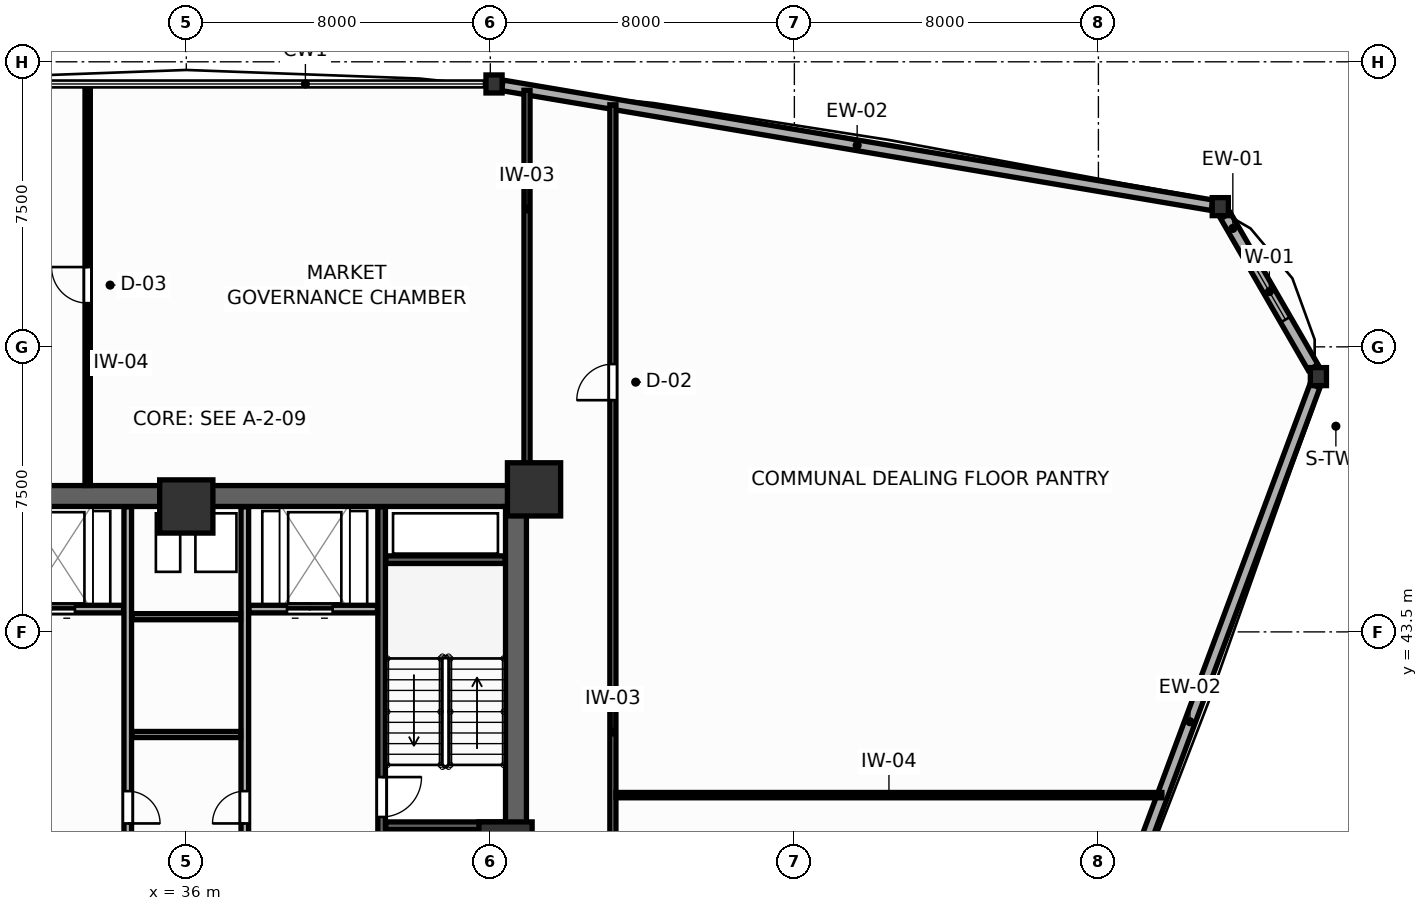
"""IFC4 building model, lengths in metres.
Left out: names, types, materials, properties, quantities, classifications, styles, units other than length and angle.
Written with IfcOpenShell. Run it as: python <this file> out.ifc"""

import sys

from ifc_helpers import new_model, si_unit, direction, frame, frame_2d, origin, origin_2d, place, context, subcontext, project, spatial, rectangle, i_section, extrude, source, transform, mapped, element, fill, save


model = new_model("IFC4")
c1 = context("Model", 3, precision=1e-05, world=origin(), true_north=direction((0.0, 1.0)))
c2 = subcontext(c1, "Body", "Model", "MODEL_VIEW")
j1 = project(units=[si_unit("LENGTHUNIT", "METRE"), si_unit("PLANEANGLEUNIT", "RADIAN")], contexts=[c1])
p1 = place(None, origin())
s1 = spatial("IfcSite", under=j1, at=p1, CompositionType="ELEMENT")
p2 = place(p1, origin())
s2 = spatial("IfcBuilding", under=s1, at=p2, CompositionType="ELEMENT")
p3 = place(p2, frame((0.0, 0.0, 27.9)))
s3 = spatial("IfcBuildingStorey", under=s2, at=p3, CompositionType="ELEMENT", Elevation=27.9)
p4 = place(p3, frame((27.05, 47.075, 0.0), z_axis=(0.0, 0.0, 1.0), x_axis=(1.0, 0.0, 0.0)))
e1 = element("IfcWall", 1, at=p4, inside=s3, PredefinedType="SHEAR", context=c2, shape_type="SweptSolid", body=[
    extrude(rectangle(XDim=17.9, YDim=0.55, at=frame_2d((8.95, 0.0))), origin(), (0.0, 0.0, 1.0), 3.9),
])
p5 = place(p3, frame((44.675, 37.8, 0.0), z_axis=(0.0, 0.0, 1.0), x_axis=(0.0, 1.0, 0.0)))
e2 = element("IfcWall", 2, at=p5, inside=s3, PredefinedType="SHEAR", context=c2, shape_type="SweptSolid", body=[
    extrude(rectangle(XDim=9.0, YDim=0.55, at=frame_2d((4.5, 0.0))), origin(), (0.0, 0.0, 1.0), 3.9),
])
m1 = source(origin(), c2, "Body", "SweptSolid", [
    extrude(rectangle(XDim=1.4, YDim=1.4, at=origin_2d()), origin(), (0.0, 0.0, 1.0), 3.9),
])
for number, where, z_axis, x_axis in (
    (3, (45.15, 47.25, 0.0), (0.0, 0.0, 1.0), (1.0, 0.0, 0.0)),
    (4, (44.4, 37.8, 0.0), (0.0, 0.0, 1.0), (1.0, 0.0, 0.0)),
    (5, (36.0, 46.8, 0.0), (0.0, 0.0, 1.0), (1.0, 0.0, 0.0)),
):
    element("IfcColumn", number, at=place(p3, frame(where, z_axis=z_axis, x_axis=x_axis)), inside=s3, PredefinedType="COLUMN", context=c2, shape_type="MappedRepresentation", body=[
        mapped(m1, transform((0.0, 0.0, 0.0), scale=1.0)),
    ])
m2 = source(origin(), c2, "Body", "SweptSolid", [
    extrude(i_section(OverallWidth=0.424, OverallDepth=0.474, WebThickness=0.045, FlangeThickness=0.072, FilletRadius=0.015, at=origin_2d()), origin(), (0.0, 0.0, 1.0), 3.9),
])
for number, where, z_axis, x_axis in (
    (6, (65.789, 50.217, 0.0), (0.0, 0.0, 1.0), (1.0, 0.0, 0.0)),
    (7, (63.207, 54.689, 0.0), (0.0, 0.0, 1.0), (1.0, 0.0, 0.0)),
    (8, (44.097, 57.917, 0.0), (0.0, 0.0, 1.0), (1.0, 0.0, 0.0)),
):
    element("IfcColumn", number, at=place(p3, frame(where, z_axis=z_axis, x_axis=x_axis)), inside=s3, PredefinedType="COLUMN", context=c2, shape_type="MappedRepresentation", body=[
        mapped(m2, transform((0.0, 0.0, 0.0), scale=1.0)),
    ])
p6 = place(p3, frame((65.649, 50.459, 0.0), z_axis=(0.0, 0.0, 1.0), x_axis=(-0.500022295776, 0.86601253093, 0.0)))
e9 = element("IfcWall", 9, at=p6, inside=s3, PredefinedType="SOLIDWALL", context=c2, shape_type="SweptSolid", body=[
    extrude(rectangle(XDim=4.605, YDim=0.3, at=frame_2d((2.302, 0.0))), origin(), (0.0, 0.0, 1.0), 3.23),
])
p7 = place(p6, frame((1.452, 0.0, 0.75)))
e10 = element("IfcOpeningElement", 10, at=p7, cuts=e9, PredefinedType="OPENING", context=c2, shape_type="SweptSolid", body=[
    extrude(rectangle(XDim=1.7, YDim=1.75, at=frame_2d((0.85, 0.875))), frame((0.0, 0.16, 0.0), z_axis=(0.0, -1.0, 0.0), x_axis=(1.0, 0.0, 0.0)), (0.0, 0.0, 1.0), 0.32),
])
p8 = place(p3, frame((62.99, 54.726, 0.0), z_axis=(0.0, 0.0, 1.0), x_axis=(-0.98603202958, 0.166555806393, 0.0)))
e11 = element("IfcWall", 11, at=p8, inside=s3, PredefinedType="SOLIDWALL", context=c2, shape_type="SweptSolid", body=[
    extrude(rectangle(XDim=18.94, YDim=0.28, at=frame_2d((9.47, 0.0))), origin(), (0.0, 0.0, 1.0), 3.23),
])
p9 = place(p3, frame((59.12, 32.296, 0.0), z_axis=(0.0, 0.0, 1.0), x_axis=(0.348763587367, 0.937210734108, 0.0)))
e12 = element("IfcWall", 12, at=p9, inside=s3, PredefinedType="SOLIDWALL", context=c2, shape_type="SweptSolid", body=[
    extrude(rectangle(XDim=18.863, YDim=0.28, at=frame_2d((9.432, 0.0))), origin(), (0.0, 0.0, 1.0), 3.23),
])
p10 = place(p3, frame((41.14, 37.81, 0.0), z_axis=(0.0, 0.0, 1.0), x_axis=(0.0, 1.0, 0.0)))
e13 = element("IfcWall", 13, at=p10, inside=s3, PredefinedType="SHEAR", context=c2, shape_type="SweptSolid", body=[
    extrude(rectangle(XDim=8.98, YDim=0.2, at=frame_2d((4.49, 0.0))), origin(), (0.0, 0.0, 1.0), 3.9),
])
p11 = place(p10, frame((0.82, 0.0, 0.0)))
e14 = element("IfcOpeningElement", 14, at=p11, cuts=e13, PredefinedType="OPENING", context=c2, shape_type="SweptSolid", body=[
    extrude(rectangle(XDim=1.05, YDim=2.1, at=frame_2d((0.525, 1.05))), frame((0.0, 0.11, 0.0), z_axis=(0.0, -1.0, 0.0), x_axis=(1.0, 0.0, 0.0)), (0.0, 0.0, 1.0), 0.22),
])
for number, where, z_axis, x_axis in (
    (15, (41.25, 45.4, 0.0), (0.0, 0.0, 1.0), (1.0, 0.0, 0.0)),
    (16, (41.25, 38.4, 0.0), (0.0, 0.0, 1.0), (1.0, 0.0, 0.0)),
):
    element("IfcWall", number, at=place(p3, frame(where, z_axis=z_axis, x_axis=x_axis)), inside=s3, PredefinedType="SHEAR", context=c2, shape_type="SweptSolid", body=[
        extrude(rectangle(XDim=3.14, YDim=0.2, at=frame_2d((1.57, 0.0))), origin(), (0.0, 0.0, 1.0), 3.9),
    ])
p12 = place(p3, frame((30.97, 44.1, 0.0), z_axis=(0.0, 0.0, 1.0), x_axis=(1.0, 0.0, 0.0)))
e17 = element("IfcWall", 17, at=p12, inside=s3, PredefinedType="PARTITIONING", context=c2, shape_type="SweptSolid", body=[
    extrude(rectangle(XDim=3.38, YDim=0.2, at=frame_2d((1.69, 0.0))), origin(), (0.0, 0.0, 1.0), 3.68),
])
p13 = place(p12, frame((0.9, 0.0, 0.0)))
e18 = element("IfcOpeningElement", 18, at=p13, cuts=e17, PredefinedType="OPENING", context=c2, shape_type="SweptSolid", body=[
    extrude(rectangle(XDim=1.2, YDim=2.1, at=frame_2d((0.6, 1.05))), frame((0.0, 0.11, 0.0), z_axis=(0.0, -1.0, 0.0), x_axis=(1.0, 0.0, 0.0)), (0.0, 0.0, 1.0), 0.22),
])
p14 = place(p3, frame((37.65, 44.1, 0.0), z_axis=(0.0, 0.0, 1.0), x_axis=(1.0, 0.0, 0.0)))
e19 = element("IfcWall", 19, at=p14, inside=s3, PredefinedType="PARTITIONING", context=c2, shape_type="SweptSolid", body=[
    extrude(rectangle(XDim=3.38, YDim=0.2, at=frame_2d((1.69, 0.0))), origin(), (0.0, 0.0, 1.0), 3.68),
])
p15 = place(p14, frame((1.0, 0.0, 0.0)))
e20 = element("IfcOpeningElement", 20, at=p15, cuts=e19, PredefinedType="OPENING", context=c2, shape_type="SweptSolid", body=[
    extrude(rectangle(XDim=1.2, YDim=2.1, at=frame_2d((0.6, 1.05))), frame((0.0, 0.11, 0.0), z_axis=(0.0, -1.0, 0.0), x_axis=(1.0, 0.0, 0.0)), (0.0, 0.0, 1.0), 0.22),
])
p16 = place(p3, frame((34.46, 37.81, 0.0), z_axis=(0.0, 0.0, 1.0), x_axis=(0.0, 1.0, 0.0)))
e21 = element("IfcWall", 21, at=p16, inside=s3, PredefinedType="PARTITIONING", context=c2, shape_type="SweptSolid", body=[
    extrude(rectangle(XDim=8.98, YDim=0.2, at=frame_2d((4.49, 0.0))), origin(), (0.0, 0.0, 1.0), 3.68),
])
p17 = place(p16, frame((0.65, 0.0, 0.0)))
e22 = element("IfcOpeningElement", 22, at=p17, cuts=e21, PredefinedType="OPENING", context=c2, shape_type="SweptSolid", body=[
    extrude(rectangle(XDim=0.85, YDim=2.05, at=frame_2d((0.425, 1.025))), frame((0.0, 0.11, 0.0), z_axis=(0.0, -1.0, 0.0), x_axis=(1.0, 0.0, 0.0)), (0.0, 0.0, 1.0), 0.22),
])
p18 = place(p3, frame((37.54, 37.81, 0.0), z_axis=(0.0, 0.0, 1.0), x_axis=(0.0, 1.0, 0.0)))
e23 = element("IfcWall", 23, at=p18, inside=s3, PredefinedType="PARTITIONING", context=c2, shape_type="SweptSolid", body=[
    extrude(rectangle(XDim=8.98, YDim=0.2, at=frame_2d((4.49, 0.0))), origin(), (0.0, 0.0, 1.0), 3.68),
])
p19 = place(p18, frame((0.65, 0.0, 0.0)))
e24 = element("IfcOpeningElement", 24, at=p19, cuts=e23, PredefinedType="OPENING", context=c2, shape_type="SweptSolid", body=[
    extrude(rectangle(XDim=0.85, YDim=2.05, at=frame_2d((0.425, 1.025))), frame((0.0, 0.11, 0.0), z_axis=(0.0, -1.0, 0.0), x_axis=(1.0, 0.0, 0.0)), (0.0, 0.0, 1.0), 0.22),
])
for number, where, z_axis, x_axis in (
    (25, (34.57, 40.8, 0.0), (0.0, 0.0, 1.0), (1.0, 0.0, 0.0)),
    (26, (34.57, 43.9, 0.0), (0.0, 0.0, 1.0), (1.0, 0.0, 0.0)),
):
    element("IfcWall", number, at=place(p3, frame(where, z_axis=z_axis, x_axis=x_axis)), inside=s3, PredefinedType="PARTITIONING", context=c2, shape_type="SweptSolid", body=[
        extrude(rectangle(XDim=2.86, YDim=0.16, at=frame_2d((1.43, 0.0))), origin(), (0.0, 0.0, 1.0), 3.68),
    ])
p20 = place(p3, frame((47.225, 32.31, 0.0), z_axis=(0.0, 0.0, 1.0), x_axis=(0.0, 1.0, 0.0)))
e27 = element("IfcWall", 27, at=p20, inside=s3, PredefinedType="PARTITIONING", context=c2, shape_type="SweptSolid", body=[
    extrude(rectangle(XDim=25.059, YDim=0.16, at=frame_2d((12.529, 0.0))), origin(), (0.0, 0.0, 1.0), 3.68),
])
p21 = place(p20, frame((17.287, 0.0, 0.0)))
e28 = element("IfcOpeningElement", 28, at=p21, cuts=e27, PredefinedType="OPENING", context=c2, shape_type="SweptSolid", body=[
    extrude(rectangle(XDim=0.95, YDim=2.05, at=frame_2d((0.475, 1.025))), frame((0.0, 0.09, 0.0), z_axis=(0.0, -1.0, 0.0), x_axis=(1.0, 0.0, 0.0)), (0.0, 0.0, 1.0), 0.18),
])
p22 = place(p3, frame((44.965, 47.34, 0.0), z_axis=(0.0, 0.0, 1.0), x_axis=(0.0, 1.0, 0.0)))
e29 = element("IfcWall", 29, at=p22, inside=s3, PredefinedType="PARTITIONING", context=c2, shape_type="SweptSolid", body=[
    extrude(rectangle(XDim=10.41, YDim=0.16, at=frame_2d((5.205, 0.0))), origin(), (0.0, 0.0, 1.0), 3.18),
])
p23 = place(p3, frame((47.307, 39.205, 0.0), z_axis=(0.0, 0.0, 1.0), x_axis=(1.0, 0.0, 0.0)))
e30 = element("IfcWall", 30, at=p23, inside=s3, PredefinedType="PARTITIONING", context=c2, shape_type="SweptSolid", body=[
    extrude(rectangle(XDim=14.364, YDim=0.14, at=frame_2d((7.182, 0.0))), origin(), (0.0, 0.0, 1.0), 3.68),
])
p24 = place(p3, frame((33.405, 47.352, 0.0), z_axis=(0.0, 0.0, 1.0), x_axis=(0.0, 1.0, 0.0)))
e31 = element("IfcWall", 31, at=p24, inside=s3, PredefinedType="PARTITIONING", context=c2, shape_type="SweptSolid", body=[
    extrude(rectangle(XDim=10.545, YDim=0.14, at=frame_2d((5.272, 0.0))), origin(), (0.0, 0.0, 1.0), 3.68),
])
p25 = place(p24, frame((4.798, 0.0, 0.0)))
e32 = element("IfcOpeningElement", 32, at=p25, cuts=e31, PredefinedType="OPENING", context=c2, shape_type="SweptSolid", body=[
    extrude(rectangle(XDim=0.95, YDim=2.05, at=frame_2d((0.475, 1.025))), frame((0.0, 0.08, 0.0), z_axis=(0.0, -1.0, 0.0), x_axis=(1.0, 0.0, 0.0)), (0.0, 0.0, 1.0), 0.16),
])
p26 = place(p7, origin())
e33 = element("IfcWindow", 33, at=p26, inside=s3, PartitioningType="SINGLE_PANEL", PredefinedType="WINDOW", context=c2, shape_type="SweptSolid", body=[
    extrude(rectangle(XDim=1.7, YDim=1.75, at=frame_2d((0.85, 0.875))), frame((0.0, 0.03, 0.0), z_axis=(0.0, -1.0, 0.0), x_axis=(1.0, 0.0, 0.0)), (0.0, 0.0, 1.0), 0.06),
])
fill(e10, e33)
p27 = place(p11, frame((1.05, 0.0, 0.0), z_axis=(0.0, 0.0, 1.0), x_axis=(-1.0, 0.0, 0.0)))
e34 = element("IfcDoor", 34, at=p27, inside=s3, OperationType="SINGLE_SWING_LEFT", PredefinedType="DOOR", context=c2, shape_type="SweptSolid", body=[
    extrude(rectangle(XDim=1.05, YDim=2.1, at=frame_2d((0.525, 1.05))), frame((0.0, 0.025, 0.0), z_axis=(0.0, -1.0, 0.0), x_axis=(1.0, 0.0, 0.0)), (0.0, 0.0, 1.0), 0.05),
])
fill(e14, e34)
p28 = place(p13, origin())
e35 = element("IfcDoor", 35, at=p28, inside=s3, OperationType="DOUBLE_DOOR_SLIDING", PredefinedType="DOOR", context=c2, shape_type="SweptSolid", body=[
    extrude(rectangle(XDim=1.2, YDim=2.1, at=frame_2d((0.6, 1.05))), frame((0.0, 0.025, 0.0), z_axis=(0.0, -1.0, 0.0), x_axis=(1.0, 0.0, 0.0)), (0.0, 0.0, 1.0), 0.05),
])
fill(e18, e35)
p29 = place(p15, origin())
e36 = element("IfcDoor", 36, at=p29, inside=s3, OperationType="DOUBLE_DOOR_SLIDING", PredefinedType="DOOR", context=c2, shape_type="SweptSolid", body=[
    extrude(rectangle(XDim=1.2, YDim=2.1, at=frame_2d((0.6, 1.05))), frame((0.0, 0.025, 0.0), z_axis=(0.0, -1.0, 0.0), x_axis=(1.0, 0.0, 0.0)), (0.0, 0.0, 1.0), 0.05),
])
fill(e20, e36)
p30 = place(p17, frame((0.85, 0.0, 0.0), z_axis=(0.0, 0.0, 1.0), x_axis=(-1.0, 0.0, 0.0)))
e37 = element("IfcDoor", 37, at=p30, inside=s3, OperationType="SINGLE_SWING_RIGHT", PredefinedType="DOOR", context=c2, shape_type="SweptSolid", body=[
    extrude(rectangle(XDim=0.85, YDim=2.05, at=frame_2d((0.425, 1.025))), frame((0.0, 0.025, 0.0), z_axis=(0.0, -1.0, 0.0), x_axis=(1.0, 0.0, 0.0)), (0.0, 0.0, 1.0), 0.05),
])
fill(e22, e37)
p31 = place(p19, origin())
e38 = element("IfcDoor", 38, at=p31, inside=s3, OperationType="SINGLE_SWING_LEFT", PredefinedType="DOOR", context=c2, shape_type="SweptSolid", body=[
    extrude(rectangle(XDim=0.85, YDim=2.05, at=frame_2d((0.425, 1.025))), frame((0.0, 0.025, 0.0), z_axis=(0.0, -1.0, 0.0), x_axis=(1.0, 0.0, 0.0)), (0.0, 0.0, 1.0), 0.05),
])
fill(e24, e38)
p32 = place(p21, origin())
e39 = element("IfcDoor", 39, at=p32, inside=s3, OperationType="SINGLE_SWING_LEFT", PredefinedType="DOOR", context=c2, shape_type="SweptSolid", body=[
    extrude(rectangle(XDim=0.95, YDim=2.05, at=frame_2d((0.475, 1.025))), frame((0.0, 0.025, 0.0), z_axis=(0.0, -1.0, 0.0), x_axis=(1.0, 0.0, 0.0)), (0.0, 0.0, 1.0), 0.05),
])
fill(e28, e39)
p33 = place(p25, origin())
e40 = element("IfcDoor", 40, at=p33, inside=s3, OperationType="SINGLE_SWING_RIGHT", PredefinedType="DOOR", context=c2, shape_type="SweptSolid", body=[
    extrude(rectangle(XDim=0.95, YDim=2.05, at=frame_2d((0.475, 1.025))), frame((0.0, 0.025, 0.0), z_axis=(0.0, -1.0, 0.0), x_axis=(1.0, 0.0, 0.0)), (0.0, 0.0, 1.0), 0.05),
])
fill(e32, e40)
save(model, sys.argv[1])
